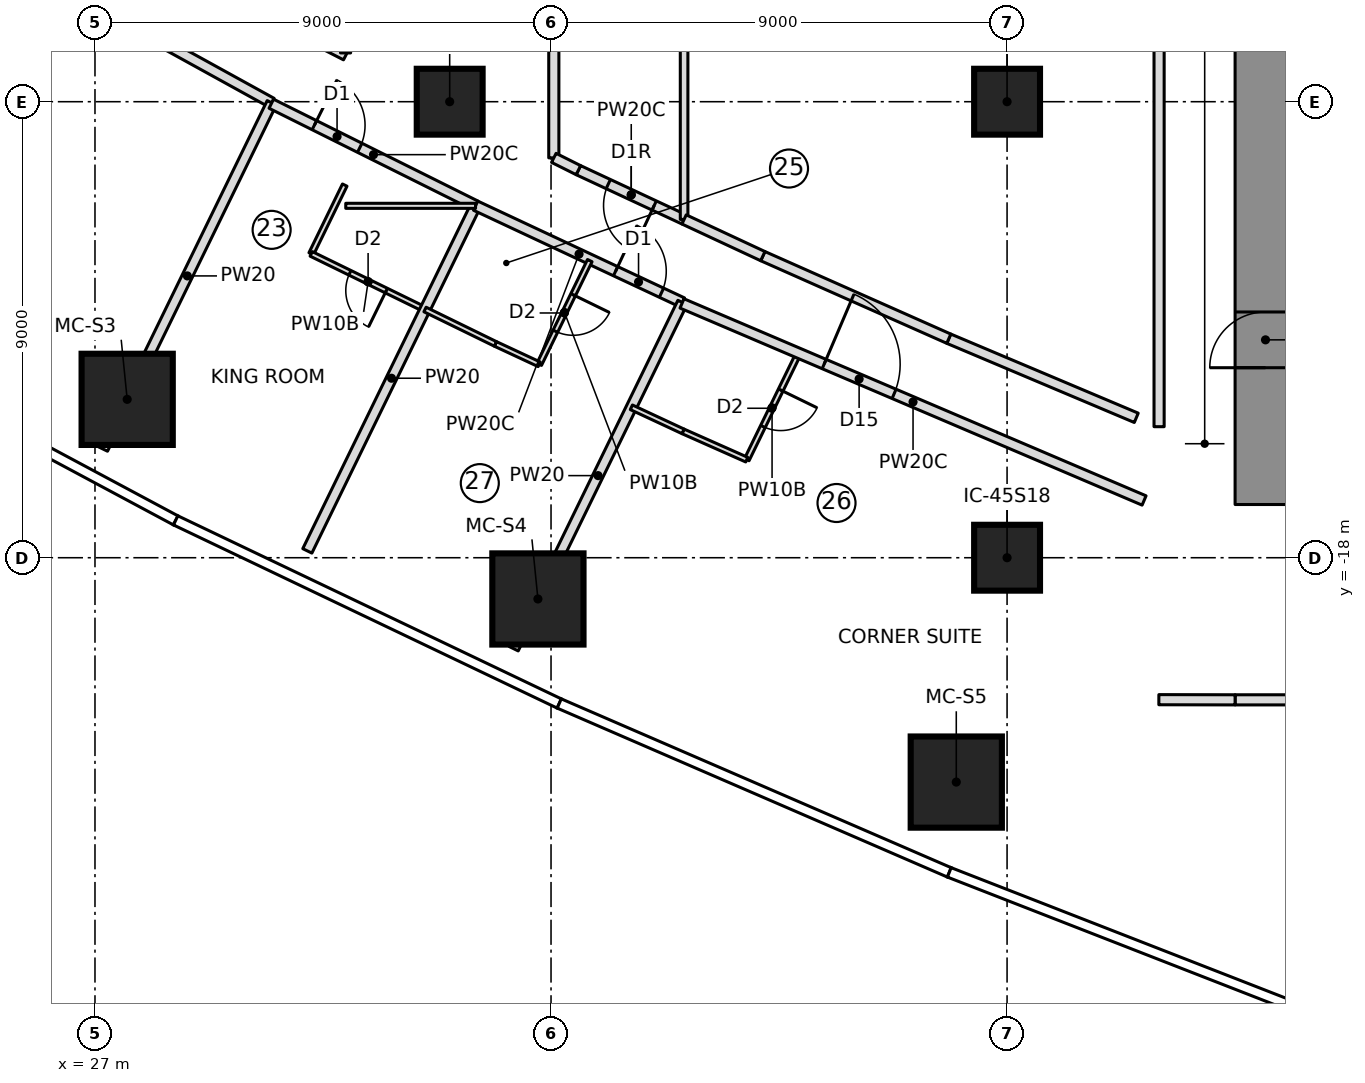
"""IFC4 building model, lengths in metres.
Left out: names, types, materials, properties, quantities, classifications, styles, units other than length and angle.
Written with IfcOpenShell. Run it as: python <this file> out.ifc"""

import sys

from ifc_helpers import new_model, si_unit, direction, frame, frame_2d, origin, origin_2d, place, context, subcontext, project, spatial, rectangle, extrude, element, fill, save


model = new_model("IFC4")
c1 = context("Model", 3, precision=1e-05, world=origin(), true_north=direction((0.0, 1.0)))
c2 = subcontext(c1, "Body", "Model", "MODEL_VIEW")
j1 = project(units=[si_unit("LENGTHUNIT", "METRE"), si_unit("PLANEANGLEUNIT", "RADIAN")], contexts=[c1])
p1 = place(None, origin())
s1 = spatial("IfcSite", under=j1, at=p1, CompositionType="ELEMENT")
p2 = place(p1, origin())
s2 = spatial("IfcBuilding", under=s1, at=p2, CompositionType="ELEMENT")
p3 = place(p2, frame((0.0, 0.0, 43.15)))
s3 = spatial("IfcBuildingStorey", under=s2, at=p3, CompositionType="ELEMENT", Elevation=43.15)
p4 = place(p3, frame((50.1, -16.95, 0.0), z_axis=(0.0, 0.0, 1.0), x_axis=(0.0, 1.0, 0.0)))
e1 = element("IfcWall", 1, at=p4, inside=s3, PredefinedType="SHEAR", context=c2, shape_type="SweptSolid", body=[
    extrude(rectangle(XDim=10.3, YDim=1.2, at=frame_2d((5.15, 0.0))), origin(), (0.0, 0.0, 1.0), 3.55),
])
p5 = place(p4, frame((2.7, 0.0, 0.0)))
e2 = element("IfcOpeningElement", 2, at=p5, cuts=e1, PredefinedType="OPENING", context=c2, shape_type="SweptSolid", body=[
    extrude(rectangle(XDim=1.1, YDim=2.1, at=frame_2d((0.55, 1.05))), frame((0.0, 0.61, 0.0), z_axis=(0.0, -1.0, 0.0), x_axis=(1.0, 0.0, 0.0)), (0.0, 0.0, 1.0), 1.22),
])
for number, where, z_axis, x_axis in (
    (3, (27.635, -14.874, 0.0), (0.0, 0.0, 1.0), (1.0, 0.0, 0.0)),
    (4, (35.741, -18.814, 0.0), (0.0, 0.0, 1.0), (1.0, 0.0, 0.0)),
    (5, (43.998, -22.428, 0.0), (0.0, 0.0, 1.0), (1.0, 0.0, 0.0)),
):
    element("IfcColumn", number, at=place(p3, frame(where, z_axis=z_axis, x_axis=x_axis)), inside=s3, PredefinedType="COLUMN", context=c2, shape_type="SweptSolid", body=[
        extrude(rectangle(XDim=1.8, YDim=1.8, at=origin_2d()), origin(), (0.0, 0.0, 1.0), 3.55),
    ])
for number, where, z_axis, x_axis in (
    (6, (34.0, -9.0, 0.0), (0.0, 0.0, 1.0), (1.0, 0.0, 0.0)),
    (7, (45.0, -18.0, 0.0), (0.0, 0.0, 1.0), (1.0, 0.0, 0.0)),
    (8, (45.0, -9.0, 0.0), (0.0, 0.0, 1.0), (1.0, 0.0, 0.0)),
):
    element("IfcColumn", number, at=place(p3, frame(where, z_axis=z_axis, x_axis=x_axis)), inside=s3, PredefinedType="COLUMN", context=c2, shape_type="SweptSolid", body=[
        extrude(rectangle(XDim=1.3, YDim=1.3, at=origin_2d()), origin(), (0.0, 0.0, 1.0), 3.55),
    ])
p6 = place(p3, frame((17.874, -2.068, 0.0), z_axis=(0.0, 0.0, 1.0), x_axis=(0.875757832755, -0.482750679305, 0.0)))
e9 = element("IfcWall", 9, at=p6, inside=s3, PredefinedType="PARTITIONING", context=c2, shape_type="SweptSolid", body=[
    extrude(rectangle(XDim=14.405, YDim=0.2, at=frame_2d((7.202, 0.0))), origin(), (0.0, 0.0, 1.0), 3.25),
])
p7 = place(p6, frame((3.05, 0.0, 0.0)))
e10 = element("IfcOpeningElement", 10, at=p7, cuts=e9, PredefinedType="OPENING", context=c2, shape_type="SweptSolid", body=[
    extrude(rectangle(XDim=1.5, YDim=2.1, at=frame_2d((0.75, 1.05))), frame((0.0, 0.11, 0.0), z_axis=(0.0, -1.0, 0.0), x_axis=(1.0, 0.0, 0.0)), (0.0, 0.0, 1.0), 0.22),
])
p8 = place(p3, frame((27.157, -15.854, 0.0), z_axis=(0.0, 0.0, 1.0), x_axis=(0.43822365664, 0.898865967072, 0.0)))
e11 = element("IfcWall", 11, at=p8, inside=s3, PredefinedType="PARTITIONING", context=c2, shape_type="SweptSolid", body=[
    extrude(rectangle(XDim=7.601, YDim=0.2, at=frame_2d((3.801, 0.0))), origin(), (0.0, 0.0, 1.0), 3.25),
])
p9 = place(p3, frame((30.48, -9.04, 0.0), z_axis=(0.0, 0.0, 1.0), x_axis=(0.894989913054, -0.446086376761, 0.0)))
e12 = element("IfcWall", 12, at=p9, inside=s3, PredefinedType="PARTITIONING", context=c2, shape_type="SweptSolid", body=[
    extrude(rectangle(XDim=4.506, YDim=0.2, at=frame_2d((2.253, 0.0))), origin(), (0.0, 0.0, 1.0), 3.25),
])
p10 = place(p9, frame((0.95, 0.0, 0.0)))
e13 = element("IfcOpeningElement", 13, at=p10, cuts=e12, PredefinedType="OPENING", context=c2, shape_type="SweptSolid", body=[
    extrude(rectangle(XDim=1.0, YDim=2.1, at=frame_2d((0.5, 1.05))), frame((0.0, 0.11, 0.0), z_axis=(0.0, -1.0, 0.0), x_axis=(1.0, 0.0, 0.0)), (0.0, 0.0, 1.0), 0.22),
])
p11 = place(p3, frame((31.267, -12.003, 0.0), z_axis=(0.0, 0.0, 1.0), x_axis=(0.438136931394, 0.898908243008, 0.0)))
e14 = element("IfcWall", 14, at=p11, inside=s3, PredefinedType="PARTITIONING", context=c2, shape_type="SweptSolid", body=[
    extrude(rectangle(XDim=1.51, YDim=0.1, at=frame_2d((0.755, 0.0))), origin(), (0.0, 0.0, 1.0), 3.25),
])
p12 = place(p3, frame((33.513, -13.101, 0.0), z_axis=(0.0, 0.0, 1.0), x_axis=(-0.89845285455, 0.439070003702, 0.0)))
e15 = element("IfcWall", 15, at=p12, inside=s3, PredefinedType="PARTITIONING", context=c2, shape_type="SweptSolid", body=[
    extrude(rectangle(XDim=2.5, YDim=0.1, at=frame_2d((1.25, 0.0))), origin(), (0.0, 0.0, 1.0), 3.25),
])
p13 = place(p12, frame((0.85, 0.0, 0.0)))
e16 = element("IfcOpeningElement", 16, at=p13, cuts=e15, PredefinedType="OPENING", context=c2, shape_type="SweptSolid", body=[
    extrude(rectangle(XDim=0.8, YDim=2.1, at=frame_2d((0.4, 1.05))), frame((0.0, 0.06, 0.0), z_axis=(0.0, -1.0, 0.0), x_axis=(1.0, 0.0, 0.0)), (0.0, 0.0, 1.0), 0.12),
])
p14 = place(p3, frame((31.191, -17.865, 0.0), z_axis=(0.0, 0.0, 1.0), x_axis=(0.438187612283, 0.898883538865, 0.0)))
e17 = element("IfcWall", 17, at=p14, inside=s3, PredefinedType="PARTITIONING", context=c2, shape_type="SweptSolid", body=[
    extrude(rectangle(XDim=7.582, YDim=0.2, at=frame_2d((3.791, 0.0))), origin(), (0.0, 0.0, 1.0), 3.25),
])
p15 = place(p3, frame((34.512, -11.052, 0.0), z_axis=(0.0, 0.0, 1.0), x_axis=(0.905585758423, -0.424163216394, 0.0)))
e18 = element("IfcWall", 18, at=p15, inside=s3, PredefinedType="PARTITIONING", context=c2, shape_type="SweptSolid", body=[
    extrude(rectangle(XDim=4.507, YDim=0.2, at=frame_2d((2.253, 0.0))), origin(), (0.0, 0.0, 1.0), 3.25),
])
p16 = place(p15, frame((3.05, 0.0, 0.0)))
e19 = element("IfcOpeningElement", 19, at=p16, cuts=e18, PredefinedType="OPENING", context=c2, shape_type="SweptSolid", body=[
    extrude(rectangle(XDim=1.0, YDim=2.1, at=frame_2d((0.5, 1.05))), frame((0.0, 0.11, 0.0), z_axis=(0.0, -1.0, 0.0), x_axis=(1.0, 0.0, 0.0)), (0.0, 0.0, 1.0), 0.22),
])
p17 = place(p3, frame((36.765, -12.136, 0.0), z_axis=(0.0, 0.0, 1.0), x_axis=(-0.438229314017, -0.898863208912, 0.0)))
e20 = element("IfcWall", 20, at=p17, inside=s3, PredefinedType="PARTITIONING", context=c2, shape_type="SweptSolid", body=[
    extrude(rectangle(XDim=2.277, YDim=0.1, at=frame_2d((1.139, 0.0))), origin(), (0.0, 0.0, 1.0), 3.25),
])
p18 = place(p17, frame((0.75, 0.0, 0.0)))
e21 = element("IfcOpeningElement", 21, at=p18, cuts=e20, PredefinedType="OPENING", context=c2, shape_type="SweptSolid", body=[
    extrude(rectangle(XDim=0.8, YDim=2.1, at=frame_2d((0.4, 1.05))), frame((0.0, 0.06, 0.0), z_axis=(0.0, -1.0, 0.0), x_axis=(1.0, 0.0, 0.0)), (0.0, 0.0, 1.0), 0.12),
])
p19 = place(p3, frame((35.767, -14.183, 0.0), z_axis=(0.0, 0.0, 1.0), x_axis=(-0.906477304063, 0.422254540791, 0.0)))
e22 = element("IfcWall", 22, at=p19, inside=s3, PredefinedType="PARTITIONING", context=c2, shape_type="SweptSolid", body=[
    extrude(rectangle(XDim=0.953, YDim=0.1, at=frame_2d((0.477, 0.0))), origin(), (0.0, 0.0, 1.0), 3.25),
])
p20 = place(p3, frame((34.903, -13.781, 0.0), z_axis=(0.0, 0.0, 1.0), x_axis=(-0.898338680123, 0.439303557685, 0.0)))
e23 = element("IfcWall", 23, at=p20, inside=s3, PredefinedType="PARTITIONING", context=c2, shape_type="SweptSolid", body=[
    extrude(rectangle(XDim=1.547, YDim=0.1, at=frame_2d((0.773, 0.0))), origin(), (0.0, 0.0, 1.0), 3.25),
])
p21 = place(p3, frame((35.263, -19.796, 0.0), z_axis=(0.0, 0.0, 1.0), x_axis=(0.438197705697, 0.898878618459, 0.0)))
e24 = element("IfcWall", 24, at=p21, inside=s3, PredefinedType="PARTITIONING", context=c2, shape_type="SweptSolid", body=[
    extrude(rectangle(XDim=7.601, YDim=0.2, at=frame_2d((3.801, 0.0))), origin(), (0.0, 0.0, 1.0), 3.25),
])
p22 = place(p3, frame((40.861, -14.017, 0.0), z_axis=(0.0, 0.0, 1.0), x_axis=(-0.438233629628, -0.898861104878, 0.0)))
e25 = element("IfcWall", 25, at=p22, inside=s3, PredefinedType="PARTITIONING", context=c2, shape_type="SweptSolid", body=[
    extrude(rectangle(XDim=2.279, YDim=0.1, at=frame_2d((1.139, 0.0))), origin(), (0.0, 0.0, 1.0), 3.25),
])
p23 = place(p22, frame((0.75, 0.0, 0.0)))
e26 = element("IfcOpeningElement", 26, at=p23, cuts=e25, PredefinedType="OPENING", context=c2, shape_type="SweptSolid", body=[
    extrude(rectangle(XDim=0.8, YDim=2.1, at=frame_2d((0.4, 1.05))), frame((0.0, 0.06, 0.0), z_axis=(0.0, -1.0, 0.0), x_axis=(1.0, 0.0, 0.0)), (0.0, 0.0, 1.0), 0.12),
])
p24 = place(p3, frame((39.863, -16.065, 0.0), z_axis=(0.0, 0.0, 1.0), x_axis=(-0.913972512123, 0.405776104625, 0.0)))
e27 = element("IfcWall", 27, at=p24, inside=s3, PredefinedType="PARTITIONING", context=c2, shape_type="SweptSolid", body=[
    extrude(rectangle(XDim=1.375, YDim=0.1, at=frame_2d((0.688, 0.0))), origin(), (0.0, 0.0, 1.0), 3.25),
])
p25 = place(p3, frame((38.606, -15.507, 0.0), z_axis=(0.0, 0.0, 1.0), x_axis=(-0.90632717857, 0.422576673972, 0.0)))
e28 = element("IfcWall", 28, at=p25, inside=s3, PredefinedType="PARTITIONING", context=c2, shape_type="SweptSolid", body=[
    extrude(rectangle(XDim=1.125, YDim=0.1, at=frame_2d((0.563, 0.0))), origin(), (0.0, 0.0, 1.0), 3.25),
])
p26 = place(p3, frame((31.95, -8.085, 0.0), z_axis=(0.0, 0.0, 1.0), x_axis=(-0.890213377055, 0.455543788579, 0.0)))
e29 = element("IfcWall", 29, at=p26, inside=s3, PredefinedType="PARTITIONING", context=c2, shape_type="SweptSolid", body=[
    extrude(rectangle(XDim=2.912, YDim=0.2, at=frame_2d((1.456, 0.0))), origin(), (0.0, 0.0, 1.0), 3.25),
])
p27 = place(p3, frame((38.626, -11.323, 0.0), z_axis=(0.0, 0.0, 1.0), x_axis=(-0.906372737018, 0.422478948103, 0.0)))
e30 = element("IfcWall", 30, at=p27, inside=s3, PredefinedType="PARTITIONING", context=c2, shape_type="SweptSolid", body=[
    extrude(rectangle(XDim=2.302, YDim=0.2, at=frame_2d((1.151, 0.0))), origin(), (0.0, 0.0, 1.0), 3.25),
])
p28 = place(p27, frame((0.651, 0.0, 0.0)))
e31 = element("IfcOpeningElement", 31, at=p28, cuts=e30, PredefinedType="OPENING", context=c2, shape_type="SweptSolid", body=[
    extrude(rectangle(XDim=1.0, YDim=2.1, at=frame_2d((0.5, 1.05))), frame((0.0, 0.11, 0.0), z_axis=(0.0, -1.0, 0.0), x_axis=(1.0, 0.0, 0.0)), (0.0, 0.0, 1.0), 0.22),
])
p29 = place(p3, frame((38.626, -11.323, 0.0), z_axis=(0.0, 0.0, 1.0), x_axis=(0.0, 1.0, 0.0)))
e32 = element("IfcWall", 32, at=p29, inside=s3, PredefinedType="PARTITIONING", context=c2, shape_type="SweptSolid", body=[
    extrude(rectangle(XDim=22.647, YDim=0.15, at=frame_2d((11.323, 0.0))), origin(), (0.0, 0.0, 1.0), 3.25),
])
p30 = place(p3, frame((47.55, -15.239, 0.0), z_axis=(0.0, 0.0, 1.0), x_axis=(-0.921269894054, 0.388923877269, 0.0)))
e33 = element("IfcWall", 33, at=p30, inside=s3, PredefinedType="PARTITIONING", context=c2, shape_type="SweptSolid", body=[
    extrude(rectangle(XDim=4.016, YDim=0.2, at=frame_2d((2.008, 0.0))), origin(), (0.0, 0.0, 1.0), 3.25),
])
p31 = place(p3, frame((43.85, -13.677, 0.0), z_axis=(0.0, 0.0, 1.0), x_axis=(-0.913986953061, 0.405743576209, 0.0)))
e34 = element("IfcWall", 34, at=p31, inside=s3, PredefinedType="PARTITIONING", context=c2, shape_type="SweptSolid", body=[
    extrude(rectangle(XDim=4.016, YDim=0.2, at=frame_2d((2.008, 0.0))), origin(), (0.0, 0.0, 1.0), 3.25),
])
p32 = place(p3, frame((40.18, -12.048, 0.0), z_axis=(0.0, 0.0, 1.0), x_axis=(-0.906314095157, 0.422604733668, 0.0)))
e35 = element("IfcWall", 35, at=p32, inside=s3, PredefinedType="PARTITIONING", context=c2, shape_type="SweptSolid", body=[
    extrude(rectangle(XDim=1.714, YDim=0.2, at=frame_2d((0.857, 0.0))), origin(), (0.0, 0.0, 1.0), 3.25),
])
p33 = place(p3, frame((49.5, -20.805, 0.0), z_axis=(0.0, 0.0, 1.0), x_axis=(1.0, 0.0, 0.0)))
e36 = element("IfcWall", 36, at=p33, inside=s3, PredefinedType="PARTITIONING", context=c2, shape_type="SweptSolid", body=[
    extrude(rectangle(XDim=5.097, YDim=0.2, at=frame_2d((2.548, 0.0))), origin(), (0.0, 0.0, 1.0), 3.25),
])
p34 = place(p33, frame((2.048, 0.0, 0.0)))
e37 = element("IfcOpeningElement", 37, at=p34, cuts=e36, PredefinedType="OPENING", context=c2, shape_type="SweptSolid", body=[
    extrude(rectangle(XDim=1.5, YDim=2.1, at=frame_2d((0.75, 1.05))), frame((0.0, 0.11, 0.0), z_axis=(0.0, -1.0, 0.0), x_axis=(1.0, 0.0, 0.0)), (0.0, 0.0, 1.0), 0.22),
])
p35 = place(p3, frame((31.949, -11.055, 0.0), z_axis=(0.0, 0.0, 1.0), x_axis=(1.0, 0.0, 0.0)))
e38 = element("IfcWall", 38, at=p35, inside=s3, PredefinedType="PARTITIONING", context=c2, shape_type="SweptSolid", body=[
    extrude(rectangle(XDim=2.562, YDim=0.1, at=frame_2d((1.281, 0.0))), origin(), (0.0, 0.0, 1.0), 3.25),
])
p36 = place(p3, frame((38.585, -12.981, 0.0), z_axis=(0.0, 0.0, 1.0), x_axis=(0.919847962482, -0.392275064103, 0.0)))
e39 = element("IfcWall", 39, at=p36, inside=s3, PredefinedType="PARTITIONING", context=c2, shape_type="SweptSolid", body=[
    extrude(rectangle(XDim=9.914, YDim=0.2, at=frame_2d((4.957, 0.0))), origin(), (0.0, 0.0, 1.0), 3.25),
])
p37 = place(p36, frame((3.05, 0.0, 0.0)))
e40 = element("IfcOpeningElement", 40, at=p37, cuts=e39, PredefinedType="OPENING", context=c2, shape_type="SweptSolid", body=[
    extrude(rectangle(XDim=1.5, YDim=2.1, at=frame_2d((0.75, 1.05))), frame((0.0, 0.11, 0.0), z_axis=(0.0, -1.0, 0.0), x_axis=(1.0, 0.0, 0.0)), (0.0, 0.0, 1.0), 0.22),
])
p38 = place(p3, frame((31.948, -6.985, 0.0), z_axis=(0.0, 0.0, 1.0), x_axis=(-0.003248242724, -0.999994724446, 0.0)))
e41 = element("IfcWall", 41, at=p38, inside=s3, PredefinedType="PARTITIONING", context=c2, shape_type="SweptSolid", body=[
    extrude(rectangle(XDim=1.052, YDim=0.2, at=frame_2d((0.526, 0.0))), origin(), (0.0, 0.0, 1.0), 3.25),
])
p39 = place(p3, frame((36.055, -10.108, 0.0), z_axis=(0.0, 0.0, 1.0), x_axis=(0.0, 1.0, 0.0)))
e42 = element("IfcWall", 42, at=p39, inside=s3, PredefinedType="PARTITIONING", context=c2, shape_type="SweptSolid", body=[
    extrude(rectangle(XDim=3.159, YDim=0.2, at=frame_2d((1.58, 0.0))), origin(), (0.0, 0.0, 1.0), 3.25),
])
p40 = place(p3, frame((48.0, 15.414, 0.0), z_axis=(0.0, 0.0, 1.0), x_axis=(0.0, -1.0, 0.0)))
e43 = element("IfcWall", 43, at=p40, inside=s3, PredefinedType="PARTITIONING", context=c2, shape_type="SweptSolid", body=[
    extrude(rectangle(XDim=30.828, YDim=0.2, at=frame_2d((15.414, 0.0))), origin(), (0.0, 0.0, 1.0), 3.25),
])
p41 = place(p3, frame((47.995, -20.802, 0.0), z_axis=(0.0, 0.0, 1.0), x_axis=(0.999998104399, -0.001947099992, 0.0)))
e44 = element("IfcWall", 44, at=p41, inside=s3, PredefinedType="PARTITIONING", context=c2, shape_type="SweptSolid", body=[
    extrude(rectangle(XDim=1.505, YDim=0.2, at=frame_2d((0.752, 0.0))), origin(), (0.0, 0.0, 1.0), 3.25),
])
p42 = place(p3, frame((36.54, -10.351, 0.0), z_axis=(0.0, 0.0, 1.0), x_axis=(-0.894337154042, 0.447393624116, 0.0)))
e45 = element("IfcWall", 45, at=p42, inside=s3, PredefinedType="PARTITIONING", context=c2, shape_type="SweptSolid", body=[
    extrude(rectangle(XDim=0.542, YDim=0.2, at=frame_2d((0.271, 0.0))), origin(), (0.0, 0.0, 1.0), 3.25),
])
p43 = place(p13, origin())
e46 = element("IfcDoor", 46, at=p43, inside=s3, OperationType="SINGLE_SWING_LEFT", PredefinedType="DOOR", context=c2, shape_type="SweptSolid", body=[
    extrude(rectangle(XDim=0.8, YDim=2.1, at=frame_2d((0.4, 1.05))), frame((0.0, 0.025, 0.0), z_axis=(0.0, -1.0, 0.0), x_axis=(1.0, 0.0, 0.0)), (0.0, 0.0, 1.0), 0.05),
])
fill(e16, e46)
p44 = place(p10, origin())
e47 = element("IfcDoor", 47, at=p44, inside=s3, OperationType="SINGLE_SWING_LEFT", PredefinedType="DOOR", context=c2, shape_type="SweptSolid", body=[
    extrude(rectangle(XDim=1.0, YDim=2.1, at=frame_2d((0.5, 1.05))), frame((0.0, 0.025, 0.0), z_axis=(0.0, -1.0, 0.0), x_axis=(1.0, 0.0, 0.0)), (0.0, 0.0, 1.0), 0.05),
])
fill(e13, e47)
p45 = place(p18, origin())
e48 = element("IfcDoor", 48, at=p45, inside=s3, OperationType="SINGLE_SWING_LEFT", PredefinedType="DOOR", context=c2, shape_type="SweptSolid", body=[
    extrude(rectangle(XDim=0.8, YDim=2.1, at=frame_2d((0.4, 1.05))), frame((0.0, 0.025, 0.0), z_axis=(0.0, -1.0, 0.0), x_axis=(1.0, 0.0, 0.0)), (0.0, 0.0, 1.0), 0.05),
])
fill(e21, e48)
p46 = place(p16, origin())
e49 = element("IfcDoor", 49, at=p46, inside=s3, OperationType="SINGLE_SWING_LEFT", PredefinedType="DOOR", context=c2, shape_type="SweptSolid", body=[
    extrude(rectangle(XDim=1.0, YDim=2.1, at=frame_2d((0.5, 1.05))), frame((0.0, 0.025, 0.0), z_axis=(0.0, -1.0, 0.0), x_axis=(1.0, 0.0, 0.0)), (0.0, 0.0, 1.0), 0.05),
])
fill(e19, e49)
p47 = place(p23, origin())
e50 = element("IfcDoor", 50, at=p47, inside=s3, OperationType="SINGLE_SWING_LEFT", PredefinedType="DOOR", context=c2, shape_type="SweptSolid", body=[
    extrude(rectangle(XDim=0.8, YDim=2.1, at=frame_2d((0.4, 1.05))), frame((0.0, 0.025, 0.0), z_axis=(0.0, -1.0, 0.0), x_axis=(1.0, 0.0, 0.0)), (0.0, 0.0, 1.0), 0.05),
])
fill(e26, e50)
p48 = place(p37, origin())
e51 = element("IfcDoor", 51, at=p48, inside=s3, OperationType="DOUBLE_DOOR_SINGLE_SWING", PredefinedType="DOOR", context=c2, shape_type="SweptSolid", body=[
    extrude(rectangle(XDim=1.5, YDim=2.1, at=frame_2d((0.75, 1.05))), frame((0.0, 0.025, 0.0), z_axis=(0.0, -1.0, 0.0), x_axis=(1.0, 0.0, 0.0)), (0.0, 0.0, 1.0), 0.05),
])
fill(e40, e51)
p49 = place(p28, origin())
e52 = element("IfcDoor", 52, at=p49, inside=s3, OperationType="SINGLE_SWING_RIGHT", PredefinedType="DOOR", context=c2, shape_type="SweptSolid", body=[
    extrude(rectangle(XDim=1.0, YDim=2.1, at=frame_2d((0.5, 1.05))), frame((0.0, 0.025, 0.0), z_axis=(0.0, -1.0, 0.0), x_axis=(1.0, 0.0, 0.0)), (0.0, 0.0, 1.0), 0.05),
])
fill(e31, e52)
p50 = place(p5, origin())
e53 = element("IfcDoor", 53, at=p50, inside=s3, OperationType="SINGLE_SWING_RIGHT", PredefinedType="DOOR", context=c2, shape_type="SweptSolid", body=[
    extrude(rectangle(XDim=1.1, YDim=2.1, at=frame_2d((0.55, 1.05))), frame((0.0, 0.025, 0.0), z_axis=(0.0, -1.0, 0.0), x_axis=(1.0, 0.0, 0.0)), (0.0, 0.0, 1.0), 0.05),
])
fill(e2, e53)
save(model, sys.argv[1])
